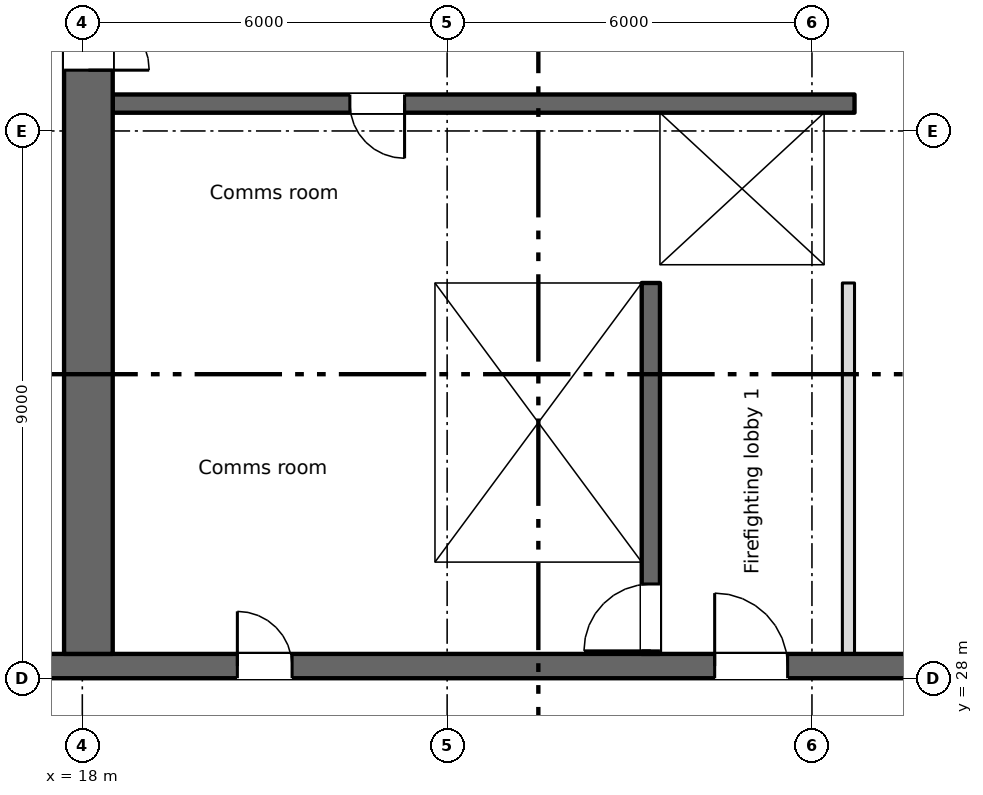
"""IFC4 building model, lengths in metres.
Left out: names, types, materials, properties, quantities, classifications, styles, units other than length and angle.
Written with IfcOpenShell. Run it as: python <this file> out.ifc"""

import sys

from ifc_helpers import new_model, si_unit, direction, frame, frame_2d, origin, place, context, subcontext, project, spatial, rectangle, extrude, element, fill, save


model = new_model("IFC4")
c1 = context("Model", 3, precision=1e-05, world=origin(), true_north=direction((0.0, 1.0)))
c2 = subcontext(c1, "Body", "Model", "MODEL_VIEW")
j1 = project(units=[si_unit("LENGTHUNIT", "METRE"), si_unit("PLANEANGLEUNIT", "RADIAN")], contexts=[c1])
p1 = place(None, origin())
s1 = spatial("IfcSite", under=j1, at=p1, CompositionType="ELEMENT")
p2 = place(p1, origin())
s2 = spatial("IfcBuilding", under=s1, at=p2, CompositionType="ELEMENT")
p3 = place(p2, frame((0.0, 0.0, 102.5)))
s3 = spatial("IfcBuildingStorey", under=s2, at=p3, CompositionType="ELEMENT", Elevation=102.5)
p4 = place(p3, frame((6.7, 28.2, 0.0), z_axis=(0.0, 0.0, 1.0), x_axis=(1.0, 0.0, 0.0)))
e1 = element("IfcWall", 1, at=p4, inside=s3, PredefinedType="SHEAR", context=c2, shape_type="SweptSolid", body=[
    extrude(rectangle(XDim=57.8, YDim=0.4, at=frame_2d((28.9, 0.0))), origin(), (0.0, 0.0, 1.0), 3.35),
])
p5 = place(p4, frame((13.85, 0.0, 0.0)))
e2 = element("IfcOpeningElement", 2, at=p5, cuts=e1, PredefinedType="OPENING", context=c2, shape_type="SweptSolid", body=[
    extrude(rectangle(XDim=0.9, YDim=2.1, at=frame_2d((0.45, 1.05))), frame((0.0, 0.21, 0.0), z_axis=(0.0, -1.0, 0.0), x_axis=(1.0, 0.0, 0.0)), (0.0, 0.0, 1.0), 0.42),
])
p6 = place(p4, frame((48.562, 0.0, 0.0)))
e3 = element("IfcOpeningElement", 3, at=p6, cuts=e1, PredefinedType="OPENING", context=c2, shape_type="SweptSolid", body=[
    extrude(rectangle(XDim=0.9, YDim=2.1, at=frame_2d((0.45, 1.05))), frame((0.0, 0.21, 0.0), z_axis=(0.0, -1.0, 0.0), x_axis=(1.0, 0.0, 0.0)), (0.0, 0.0, 1.0), 0.42),
])
p7 = place(p4, frame((51.137, 0.0, 0.0)))
e4 = element("IfcOpeningElement", 4, at=p7, cuts=e1, PredefinedType="OPENING", context=c2, shape_type="SweptSolid", body=[
    extrude(rectangle(XDim=0.9, YDim=2.1, at=frame_2d((0.45, 1.05))), frame((0.0, 0.21, 0.0), z_axis=(0.0, -1.0, 0.0), x_axis=(1.0, 0.0, 0.0)), (0.0, 0.0, 1.0), 0.42),
])
p8 = place(p4, frame((1.35, 0.0, 0.0)))
e5 = element("IfcOpeningElement", 5, at=p8, cuts=e1, PredefinedType="OPENING", context=c2, shape_type="SweptSolid", body=[
    extrude(rectangle(XDim=0.9, YDim=2.1, at=frame_2d((0.45, 1.05))), frame((0.0, 0.21, 0.0), z_axis=(0.0, -1.0, 0.0), x_axis=(1.0, 0.0, 0.0)), (0.0, 0.0, 1.0), 0.42),
])
p9 = place(p4, frame((4.7, 0.0, 0.0)))
e6 = element("IfcOpeningElement", 6, at=p9, cuts=e1, PredefinedType="OPENING", context=c2, shape_type="SweptSolid", body=[
    extrude(rectangle(XDim=1.2, YDim=2.1, at=frame_2d((0.6, 1.05))), frame((0.0, 0.21, 0.0), z_axis=(0.0, -1.0, 0.0), x_axis=(1.0, 0.0, 0.0)), (0.0, 0.0, 1.0), 0.42),
])
p10 = place(p4, frame((31.7, 0.0, 0.0)))
e7 = element("IfcOpeningElement", 7, at=p10, cuts=e1, PredefinedType="OPENING", context=c2, shape_type="SweptSolid", body=[
    extrude(rectangle(XDim=1.2, YDim=2.1, at=frame_2d((0.6, 1.05))), frame((0.0, 0.21, 0.0), z_axis=(0.0, -1.0, 0.0), x_axis=(1.0, 0.0, 0.0)), (0.0, 0.0, 1.0), 0.42),
])
p11 = place(p4, frame((55.2, 0.0, 0.0)))
e8 = element("IfcOpeningElement", 8, at=p11, cuts=e1, PredefinedType="OPENING", context=c2, shape_type="SweptSolid", body=[
    extrude(rectangle(XDim=1.2, YDim=2.1, at=frame_2d((0.6, 1.05))), frame((0.0, 0.21, 0.0), z_axis=(0.0, -1.0, 0.0), x_axis=(1.0, 0.0, 0.0)), (0.0, 0.0, 1.0), 0.42),
])
p12 = place(p4, frame((21.7, 0.0, 0.0)))
e9 = element("IfcOpeningElement", 9, at=p12, cuts=e1, PredefinedType="OPENING", context=c2, shape_type="SweptSolid", body=[
    extrude(rectangle(XDim=1.2, YDim=2.1, at=frame_2d((0.6, 1.05))), frame((0.0, 0.21, 0.0), z_axis=(0.0, -1.0, 0.0), x_axis=(1.0, 0.0, 0.0)), (0.0, 0.0, 1.0), 0.42),
])
p13 = place(p4, frame((41.7, 0.0, 0.0)))
e10 = element("IfcOpeningElement", 10, at=p13, cuts=e1, PredefinedType="OPENING", context=c2, shape_type="SweptSolid", body=[
    extrude(rectangle(XDim=1.2, YDim=2.1, at=frame_2d((0.6, 1.05))), frame((0.0, 0.21, 0.0), z_axis=(0.0, -1.0, 0.0), x_axis=(1.0, 0.0, 0.0)), (0.0, 0.0, 1.0), 0.42),
])
p14 = place(p4, frame((24.85, 0.0, 0.0)))
e11 = element("IfcOpeningElement", 11, at=p14, cuts=e1, PredefinedType="OPENING", context=c2, shape_type="SweptSolid", body=[
    extrude(rectangle(XDim=2.4, YDim=2.1, at=frame_2d((1.2, 1.05))), frame((0.0, 0.21, 0.0), z_axis=(0.0, -1.0, 0.0), x_axis=(1.0, 0.0, 0.0)), (0.0, 0.0, 1.0), 0.42),
])
p15 = place(p4, frame((37.35, 0.0, 0.0)))
e12 = element("IfcOpeningElement", 12, at=p15, cuts=e1, PredefinedType="OPENING", context=c2, shape_type="SweptSolid", body=[
    extrude(rectangle(XDim=2.4, YDim=2.1, at=frame_2d((1.2, 1.05))), frame((0.0, 0.21, 0.0), z_axis=(0.0, -1.0, 0.0), x_axis=(1.0, 0.0, 0.0)), (0.0, 0.0, 1.0), 0.42),
])
p16 = place(p4, frame((7.95, 0.0, 0.0)))
e13 = element("IfcOpeningElement", 13, at=p16, cuts=e1, PredefinedType="OPENING", context=c2, shape_type="SweptSolid", body=[
    extrude(rectangle(XDim=2.4, YDim=2.1, at=frame_2d((1.2, 1.05))), frame((0.0, 0.21, 0.0), z_axis=(0.0, -1.0, 0.0), x_axis=(1.0, 0.0, 0.0)), (0.0, 0.0, 1.0), 0.42),
])
p17 = place(p4, frame((28.85, 0.0, 0.0)))
e14 = element("IfcOpeningElement", 14, at=p17, cuts=e1, PredefinedType="OPENING", context=c2, shape_type="SweptSolid", body=[
    extrude(rectangle(XDim=0.9, YDim=2.1, at=frame_2d((0.45, 1.05))), frame((0.0, 0.21, 0.0), z_axis=(0.0, -1.0, 0.0), x_axis=(1.0, 0.0, 0.0)), (0.0, 0.0, 1.0), 0.42),
])
p18 = place(p4, frame((34.85, 0.0, 0.0)))
e15 = element("IfcOpeningElement", 15, at=p18, cuts=e1, PredefinedType="OPENING", context=c2, shape_type="SweptSolid", body=[
    extrude(rectangle(XDim=0.9, YDim=2.1, at=frame_2d((0.45, 1.05))), frame((0.0, 0.21, 0.0), z_axis=(0.0, -1.0, 0.0), x_axis=(1.0, 0.0, 0.0)), (0.0, 0.0, 1.0), 0.42),
])
p19 = place(p3, frame((18.1, 28.4, 0.0), z_axis=(0.0, 0.0, 1.0), x_axis=(0.0, 1.0, 0.0)))
e16 = element("IfcWall", 16, at=p19, inside=s3, PredefinedType="SHEAR", context=c2, shape_type="SweptSolid", body=[
    extrude(rectangle(XDim=16.8, YDim=0.8, at=frame_2d((8.4, 0.0))), origin(), (0.0, 0.0, 1.0), 3.35),
])
p20 = place(p19, frame((9.6, 0.0, 0.0)))
e17 = element("IfcOpeningElement", 17, at=p20, cuts=e16, PredefinedType="OPENING", context=c2, shape_type="SweptSolid", body=[
    extrude(rectangle(XDim=2.0, YDim=2.1, at=frame_2d((1.0, 1.05))), frame((0.0, 0.41, 0.0), z_axis=(0.0, -1.0, 0.0), x_axis=(1.0, 0.0, 0.0)), (0.0, 0.0, 1.0), 0.82),
])
p21 = place(p19, frame((15.35, 0.0, 0.0)))
e18 = element("IfcOpeningElement", 18, at=p21, cuts=e16, PredefinedType="OPENING", context=c2, shape_type="SweptSolid", body=[
    extrude(rectangle(XDim=1.2, YDim=2.1, at=frame_2d((0.6, 1.05))), frame((0.0, 0.41, 0.0), z_axis=(0.0, -1.0, 0.0), x_axis=(1.0, 0.0, 0.0)), (0.0, 0.0, 1.0), 0.82),
])
p22 = place(p3, frame((23.65, 28.4, 0.0), z_axis=(0.0, 0.0, 1.0), x_axis=(0.0, 1.0, 0.0)))
e19 = element("IfcWall", 19, at=p22, inside=s3, PredefinedType="SHEAR", context=c2, shape_type="SweptSolid", body=[
    extrude(rectangle(XDim=6.1, YDim=0.3, at=frame_2d((3.05, 0.0))), origin(), (0.0, 0.0, 1.0), 3.35),
])
p23 = place(p3, frame((27.35, 28.4, 0.0), z_axis=(0.0, 0.0, 1.0), x_axis=(0.0, 1.0, 0.0)))
e20 = element("IfcWall", 20, at=p23, inside=s3, PredefinedType="SHEAR", context=c2, shape_type="SweptSolid", body=[
    extrude(rectangle(XDim=6.1, YDim=0.3, at=frame_2d((3.05, 0.0))), origin(), (0.0, 0.0, 1.0), 3.35),
])
p24 = place(p23, frame((0.05, 0.0, 0.0)))
e21 = element("IfcOpeningElement", 21, at=p24, cuts=e20, PredefinedType="OPENING", context=c2, shape_type="SweptSolid", body=[
    extrude(rectangle(XDim=1.1, YDim=2.1, at=frame_2d((0.55, 1.05))), frame((0.0, 0.16, 0.0), z_axis=(0.0, -1.0, 0.0), x_axis=(1.0, 0.0, 0.0)), (0.0, 0.0, 1.0), 0.32),
])
p25 = place(p3, frame((18.5, 34.65, 0.0), z_axis=(0.0, 0.0, 1.0), x_axis=(1.0, 0.0, 0.0)))
e22 = element("IfcWall", 22, at=p25, inside=s3, PredefinedType="SHEAR", context=c2, shape_type="SweptSolid", body=[
    extrude(rectangle(XDim=12.2, YDim=0.3, at=frame_2d((6.1, 0.0))), origin(), (0.0, 0.0, 1.0), 3.35),
])
p26 = place(p25, frame((9.8, 0.0, 0.0)))
e23 = element("IfcOpeningElement", 23, at=p26, cuts=e22, PredefinedType="OPENING", context=c2, shape_type="SweptSolid", body=[
    extrude(rectangle(XDim=1.1, YDim=2.1, at=frame_2d((0.55, 1.05))), frame((0.0, 0.16, 0.0), z_axis=(0.0, -1.0, 0.0), x_axis=(1.0, 0.0, 0.0)), (0.0, 0.0, 1.0), 0.32),
])
p27 = place(p3, frame((30.7, 37.45, 0.0), z_axis=(0.0, 0.0, 1.0), x_axis=(-1.0, 0.0, 0.0)))
e24 = element("IfcWall", 24, at=p27, inside=s3, PredefinedType="SHEAR", context=c2, shape_type="SweptSolid", body=[
    extrude(rectangle(XDim=12.2, YDim=0.3, at=frame_2d((6.1, 0.0))), origin(), (0.0, 0.0, 1.0), 3.35),
])
p28 = place(p27, frame((7.4, 0.0, 0.0)))
e25 = element("IfcOpeningElement", 25, at=p28, cuts=e24, PredefinedType="OPENING", context=c2, shape_type="SweptSolid", body=[
    extrude(rectangle(XDim=0.9, YDim=2.1, at=frame_2d((0.45, 1.05))), frame((0.0, 0.16, 0.0), z_axis=(0.0, -1.0, 0.0), x_axis=(1.0, 0.0, 0.0)), (0.0, 0.0, 1.0), 0.32),
])
p29 = place(p3, frame((27.35, 34.8, 0.0), z_axis=(0.0, 0.0, 1.0), x_axis=(0.0, 1.0, 0.0)))
e26 = element("IfcWall", 26, at=p29, inside=s3, PredefinedType="SHEAR", context=c2, shape_type="SweptSolid", body=[
    extrude(rectangle(XDim=2.5, YDim=0.3, at=frame_2d((1.25, 0.0))), origin(), (0.0, 0.0, 1.0), 3.35),
])
p30 = place(p3, frame((30.45, 34.8, 0.0), z_axis=(0.0, 0.0, 1.0), x_axis=(0.0, 1.0, 0.0)))
e27 = element("IfcWall", 27, at=p30, inside=s3, PredefinedType="SHEAR", context=c2, shape_type="SweptSolid", body=[
    extrude(rectangle(XDim=2.5, YDim=0.5, at=frame_2d((1.25, 0.0))), origin(), (0.0, 0.0, 1.0), 3.35),
])
p31 = place(p3, frame((30.6, 28.4, 0.0), z_axis=(0.0, 0.0, 1.0), x_axis=(0.0, 1.0, 0.0)))
e28 = element("IfcWall", 28, at=p31, inside=s3, PredefinedType="PARTITIONING", context=c2, shape_type="SweptSolid", body=[
    extrude(rectangle(XDim=6.1, YDim=0.2, at=frame_2d((3.05, 0.0))), origin(), (0.0, 0.0, 1.0), 3.35),
])
p32 = place(p5, origin())
e29 = element("IfcDoor", 29, at=p32, inside=s3, OperationType="SINGLE_SWING_LEFT", PredefinedType="DOOR", context=c2, shape_type="SweptSolid", body=[
    extrude(rectangle(XDim=0.9, YDim=2.1, at=frame_2d((0.45, 1.05))), frame((0.0, 0.025, 0.0), z_axis=(0.0, -1.0, 0.0), x_axis=(1.0, 0.0, 0.0)), (0.0, 0.0, 1.0), 0.05),
])
fill(e2, e29)
p33 = place(p28, origin())
e30 = element("IfcDoor", 30, at=p33, inside=s3, OperationType="SINGLE_SWING_LEFT", PredefinedType="DOOR", context=c2, shape_type="SweptSolid", body=[
    extrude(rectangle(XDim=0.9, YDim=2.1, at=frame_2d((0.45, 1.05))), frame((0.0, 0.025, 0.0), z_axis=(0.0, -1.0, 0.0), x_axis=(1.0, 0.0, 0.0)), (0.0, 0.0, 1.0), 0.05),
])
fill(e25, e30)
p34 = place(p26, origin())
e31 = element("IfcDoor", 31, at=p34, inside=s3, OperationType="SLIDING_TO_LEFT", PredefinedType="DOOR", context=c2, shape_type="SweptSolid", body=[
    extrude(rectangle(XDim=1.1, YDim=2.1, at=frame_2d((0.55, 1.05))), frame((0.0, 0.025, 0.0), z_axis=(0.0, -1.0, 0.0), x_axis=(1.0, 0.0, 0.0)), (0.0, 0.0, 1.0), 0.05),
])
fill(e23, e31)
p35 = place(p24, origin())
e32 = element("IfcDoor", 32, at=p35, inside=s3, OperationType="SINGLE_SWING_LEFT", PredefinedType="DOOR", context=c2, shape_type="SweptSolid", body=[
    extrude(rectangle(XDim=1.1, YDim=2.1, at=frame_2d((0.55, 1.05))), frame((0.0, 0.025, 0.0), z_axis=(0.0, -1.0, 0.0), x_axis=(1.0, 0.0, 0.0)), (0.0, 0.0, 1.0), 0.05),
])
fill(e21, e32)
p36 = place(p12, origin())
e33 = element("IfcDoor", 33, at=p36, inside=s3, OperationType="SINGLE_SWING_LEFT", PredefinedType="DOOR", context=c2, shape_type="SweptSolid", body=[
    extrude(rectangle(XDim=1.2, YDim=2.1, at=frame_2d((0.6, 1.05))), frame((0.0, 0.025, 0.0), z_axis=(0.0, -1.0, 0.0), x_axis=(1.0, 0.0, 0.0)), (0.0, 0.0, 1.0), 0.05),
])
fill(e9, e33)
p37 = place(p20, origin())
e34 = element("IfcDoor", 34, at=p37, inside=s3, OperationType="DOUBLE_DOOR_SINGLE_SWING", PredefinedType="DOOR", context=c2, shape_type="SweptSolid", body=[
    extrude(rectangle(XDim=2.0, YDim=2.1, at=frame_2d((1.0, 1.05))), frame((0.0, 0.025, 0.0), z_axis=(0.0, -1.0, 0.0), x_axis=(1.0, 0.0, 0.0)), (0.0, 0.0, 1.0), 0.05),
])
fill(e17, e34)
save(model, sys.argv[1])
